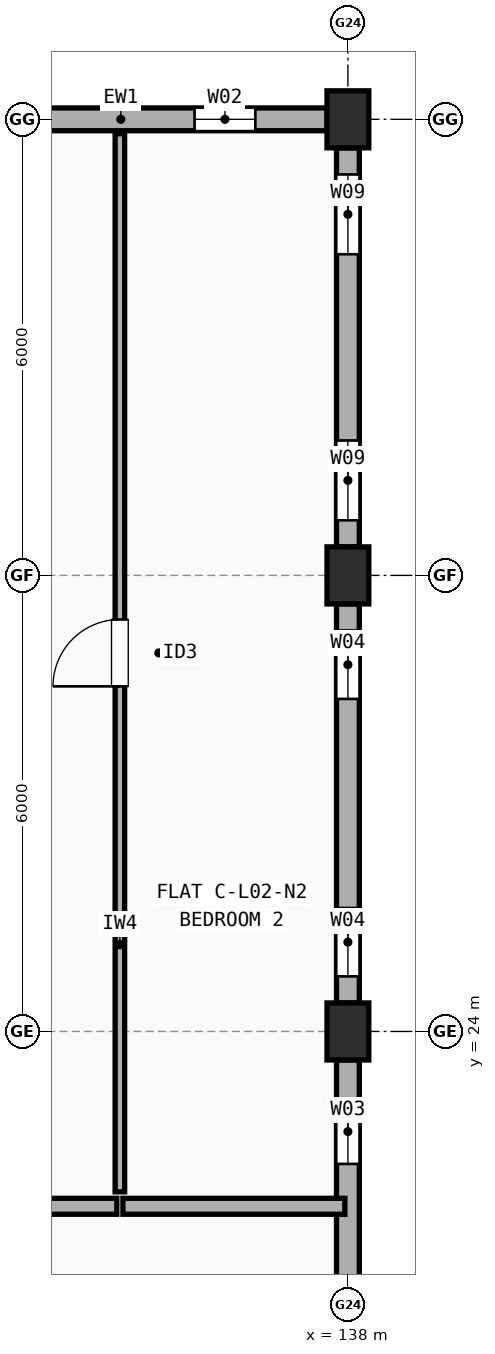
"""IFC4 building model, lengths in metres.
Left out: names, types, materials, properties, quantities, classifications, styles, units other than length and angle.
Written with IfcOpenShell. Run it as: python <this file> out.ifc"""

import sys

from ifc_helpers import new_model, si_unit, direction, frame, frame_2d, origin, origin_2d, place, context, subcontext, project, spatial, rectangle, extrude, element, fill, save


model = new_model("IFC4")
c1 = context("Model", 3, precision=1e-05, world=origin(), true_north=direction((0.0, 1.0)))
c2 = subcontext(c1, "Body", "Model", "MODEL_VIEW")
j1 = project(units=[si_unit("LENGTHUNIT", "METRE"), si_unit("PLANEANGLEUNIT", "RADIAN")], contexts=[c1])
p1 = place(None, origin())
s1 = spatial("IfcSite", under=j1, at=p1, CompositionType="ELEMENT")
p2 = place(p1, origin())
s2 = spatial("IfcBuilding", under=s1, at=p2, CompositionType="ELEMENT")
p3 = place(p2, frame((0.0, 0.0, 7.7)))
s3 = spatial("IfcBuildingStorey", under=s2, at=p3, CompositionType="ELEMENT", Elevation=7.7)
for number, where, z_axis, x_axis in (
    (1, (138.0, 24.0, 0.0), (0.0, 0.0, 1.0), (1.0, 0.0, 0.0)),
    (2, (138.0, 30.0, 0.0), (0.0, 0.0, 1.0), (1.0, 0.0, 0.0)),
    (3, (138.0, 36.0, 0.0), (0.0, 0.0, 1.0), (1.0, 0.0, 0.0)),
):
    element("IfcColumn", number, at=place(p3, frame(where, z_axis=z_axis, x_axis=x_axis)), inside=s3, PredefinedType="COLUMN", context=c2, shape_type="SweptSolid", body=[
        extrude(rectangle(XDim=0.55, YDim=0.75, at=origin_2d()), origin(), (0.0, 0.0, 1.0), 2.955),
    ])
p4 = place(p3, frame((138.0, 18.375, 0.0), z_axis=(0.0, 0.0, 1.0), x_axis=(0.0, 1.0, 0.0)))
e4 = element("IfcWall", 4, at=p4, inside=s3, PredefinedType="STANDARD", context=c2, shape_type="SweptSolid", body=[
    extrude(rectangle(XDim=5.25, YDim=0.3, at=frame_2d((2.625, 0.0))), origin(), (0.0, 0.0, 1.0), 2.437),
])
p5 = place(p4, frame((1.242, 0.0, 0.9)))
e5 = element("IfcOpeningElement", 5, at=p5, cuts=e4, PredefinedType="OPENING", context=c2, shape_type="SweptSolid", body=[
    extrude(rectangle(XDim=0.8, YDim=1.2, at=frame_2d((0.4, 0.6))), frame((0.0, 0.16, 0.0), z_axis=(0.0, -1.0, 0.0), x_axis=(1.0, 0.0, 0.0)), (0.0, 0.0, 1.0), 0.32),
])
p6 = place(p4, frame((3.883, 0.0, 0.9)))
e6 = element("IfcOpeningElement", 6, at=p6, cuts=e4, PredefinedType="OPENING", context=c2, shape_type="SweptSolid", body=[
    extrude(rectangle(XDim=0.85, YDim=1.25, at=frame_2d((0.425, 0.625))), frame((0.0, 0.16, 0.0), z_axis=(0.0, -1.0, 0.0), x_axis=(1.0, 0.0, 0.0)), (0.0, 0.0, 1.0), 0.32),
])
p7 = place(p3, frame((138.0, 24.375, 0.0), z_axis=(0.0, 0.0, 1.0), x_axis=(0.0, 1.0, 0.0)))
e7 = element("IfcWall", 7, at=p7, inside=s3, PredefinedType="STANDARD", context=c2, shape_type="SweptSolid", body=[
    extrude(rectangle(XDim=5.25, YDim=0.3, at=frame_2d((2.625, 0.0))), origin(), (0.0, 0.0, 1.0), 2.437),
])
p8 = place(p7, frame((0.35, 0.0, 0.9)))
e8 = element("IfcOpeningElement", 8, at=p8, cuts=e7, PredefinedType="OPENING", context=c2, shape_type="SweptSolid", body=[
    extrude(rectangle(XDim=0.9, YDim=1.3, at=frame_2d((0.45, 0.65))), frame((0.0, 0.16, 0.0), z_axis=(0.0, -1.0, 0.0), x_axis=(1.0, 0.0, 0.0)), (0.0, 0.0, 1.0), 0.32),
])
p9 = place(p7, frame((4.0, 0.0, 0.9)))
e9 = element("IfcOpeningElement", 9, at=p9, cuts=e7, PredefinedType="OPENING", context=c2, shape_type="SweptSolid", body=[
    extrude(rectangle(XDim=0.9, YDim=1.3, at=frame_2d((0.45, 0.65))), frame((0.0, 0.16, 0.0), z_axis=(0.0, -1.0, 0.0), x_axis=(1.0, 0.0, 0.0)), (0.0, 0.0, 1.0), 0.32),
])
p10 = place(p3, frame((138.0, 30.375, 0.0), z_axis=(0.0, 0.0, 1.0), x_axis=(0.0, 1.0, 0.0)))
e10 = element("IfcWall", 10, at=p10, inside=s3, PredefinedType="STANDARD", context=c2, shape_type="SweptSolid", body=[
    extrude(rectangle(XDim=5.25, YDim=0.3, at=frame_2d((2.625, 0.0))), origin(), (0.0, 0.0, 1.0), 2.437),
])
p11 = place(p10, frame((0.35, 0.0, 0.9)))
e11 = element("IfcOpeningElement", 11, at=p11, cuts=e10, PredefinedType="OPENING", context=c2, shape_type="SweptSolid", body=[
    extrude(rectangle(XDim=1.05, YDim=1.35, at=frame_2d((0.525, 0.675))), frame((0.0, 0.16, 0.0), z_axis=(0.0, -1.0, 0.0), x_axis=(1.0, 0.0, 0.0)), (0.0, 0.0, 1.0), 0.32),
])
p12 = place(p10, frame((3.85, 0.0, 0.9)))
e12 = element("IfcOpeningElement", 12, at=p12, cuts=e10, PredefinedType="OPENING", context=c2, shape_type="SweptSolid", body=[
    extrude(rectangle(XDim=1.05, YDim=1.35, at=frame_2d((0.525, 0.675))), frame((0.0, 0.16, 0.0), z_axis=(0.0, -1.0, 0.0), x_axis=(1.0, 0.0, 0.0)), (0.0, 0.0, 1.0), 0.32),
])
p13 = place(p3, frame((137.725, 36.0, 0.0), z_axis=(0.0, 0.0, 1.0), x_axis=(-1.0, 0.0, 0.0)))
e13 = element("IfcWall", 13, at=p13, inside=s3, PredefinedType="STANDARD", context=c2, shape_type="SweptSolid", body=[
    extrude(rectangle(XDim=5.45, YDim=0.3, at=frame_2d((2.725, 0.0))), origin(), (0.0, 0.0, 1.0), 2.437),
])
p14 = place(p13, frame((0.942, 0.0, 0.9)))
e14 = element("IfcOpeningElement", 14, at=p14, cuts=e13, PredefinedType="OPENING", context=c2, shape_type="SweptSolid", body=[
    extrude(rectangle(XDim=0.8, YDim=1.2, at=frame_2d((0.4, 0.6))), frame((0.0, 0.16, 0.0), z_axis=(0.0, -1.0, 0.0), x_axis=(1.0, 0.0, 0.0)), (0.0, 0.0, 1.0), 0.32),
])
p15 = place(p13, frame((3.683, 0.0, 0.9)))
e15 = element("IfcOpeningElement", 15, at=p15, cuts=e13, PredefinedType="OPENING", context=c2, shape_type="SweptSolid", body=[
    extrude(rectangle(XDim=0.85, YDim=1.25, at=frame_2d((0.425, 0.625))), frame((0.0, 0.16, 0.0), z_axis=(0.0, -1.0, 0.0), x_axis=(1.0, 0.0, 0.0)), (0.0, 0.0, 1.0), 0.32),
])
p16 = place(p3, frame((124.54, 21.7, 0.0), z_axis=(0.0, 0.0, 1.0), x_axis=(1.0, 0.0, 0.0)))
e16 = element("IfcWall", 16, at=p16, inside=s3, PredefinedType="SOLIDWALL", context=c2, shape_type="SweptSolid", body=[
    extrude(rectangle(XDim=10.42, YDim=0.21, at=frame_2d((5.21, 0.0))), origin(), (0.0, 0.0, 1.0), 2.437),
])
p17 = place(p16, frame((4.72, 0.0, 0.0)))
e17 = element("IfcOpeningElement", 17, at=p17, cuts=e16, PredefinedType="OPENING", context=c2, shape_type="SweptSolid", body=[
    extrude(rectangle(XDim=0.98, YDim=2.15, at=frame_2d((0.49, 1.075))), frame((0.0, 0.115, 0.0), z_axis=(0.0, -1.0, 0.0), x_axis=(1.0, 0.0, 0.0)), (0.0, 0.0, 1.0), 0.23),
])
p18 = place(p3, frame((135.04, 21.7, 0.0), z_axis=(0.0, 0.0, 1.0), x_axis=(1.0, 0.0, 0.0)))
e18 = element("IfcWall", 18, at=p18, inside=s3, PredefinedType="SOLIDWALL", context=c2, shape_type="SweptSolid", body=[
    extrude(rectangle(XDim=2.92, YDim=0.21, at=frame_2d((1.46, 0.0))), origin(), (0.0, 0.0, 1.0), 2.437),
])
p19 = place(p3, frame((135.0, 21.89, 0.0), z_axis=(0.0, 0.0, 1.0), x_axis=(0.0, 1.0, 0.0)))
e19 = element("IfcWall", 19, at=p19, inside=s3, PredefinedType="PARTITIONING", context=c2, shape_type="SweptSolid", body=[
    extrude(rectangle(XDim=13.92, YDim=0.125, at=frame_2d((6.96, 0.0))), origin(), (0.0, 0.0, 1.0), 2.387),
])
p20 = place(p19, frame((6.65, 0.0, 0.0)))
e20 = element("IfcOpeningElement", 20, at=p20, cuts=e19, PredefinedType="OPENING", context=c2, shape_type="SweptSolid", body=[
    extrude(rectangle(XDim=0.88, YDim=2.1, at=frame_2d((0.44, 1.05))), frame((0.0, 0.073, 0.0), z_axis=(0.0, -1.0, 0.0), x_axis=(1.0, 0.0, 0.0)), (0.0, 0.0, 1.0), 0.145),
])
p21 = place(p6, origin())
e21 = element("IfcWindow", 21, at=p21, inside=s3, PartitioningType="SINGLE_PANEL", PredefinedType="WINDOW", context=c2, shape_type="SweptSolid", body=[
    extrude(rectangle(XDim=0.85, YDim=1.25, at=frame_2d((0.425, 0.625))), frame((0.0, 0.03, 0.0), z_axis=(0.0, -1.0, 0.0), x_axis=(1.0, 0.0, 0.0)), (0.0, 0.0, 1.0), 0.06),
])
fill(e6, e21)
p22 = place(p8, origin())
e22 = element("IfcWindow", 22, at=p22, inside=s3, PartitioningType="SINGLE_PANEL", PredefinedType="WINDOW", context=c2, shape_type="SweptSolid", body=[
    extrude(rectangle(XDim=0.9, YDim=1.3, at=frame_2d((0.45, 0.65))), frame((0.0, 0.03, 0.0), z_axis=(0.0, -1.0, 0.0), x_axis=(1.0, 0.0, 0.0)), (0.0, 0.0, 1.0), 0.06),
])
fill(e8, e22)
p23 = place(p9, origin())
e23 = element("IfcWindow", 23, at=p23, inside=s3, PartitioningType="SINGLE_PANEL", PredefinedType="WINDOW", context=c2, shape_type="SweptSolid", body=[
    extrude(rectangle(XDim=0.9, YDim=1.3, at=frame_2d((0.45, 0.65))), frame((0.0, 0.03, 0.0), z_axis=(0.0, -1.0, 0.0), x_axis=(1.0, 0.0, 0.0)), (0.0, 0.0, 1.0), 0.06),
])
fill(e9, e23)
p24 = place(p11, origin())
e24 = element("IfcWindow", 24, at=p24, inside=s3, PartitioningType="SINGLE_PANEL", PredefinedType="WINDOW", context=c2, shape_type="SweptSolid", body=[
    extrude(rectangle(XDim=1.05, YDim=1.35, at=frame_2d((0.525, 0.675))), frame((0.0, 0.03, 0.0), z_axis=(0.0, -1.0, 0.0), x_axis=(1.0, 0.0, 0.0)), (0.0, 0.0, 1.0), 0.06),
])
fill(e11, e24)
p25 = place(p12, origin())
e25 = element("IfcWindow", 25, at=p25, inside=s3, PartitioningType="SINGLE_PANEL", PredefinedType="WINDOW", context=c2, shape_type="SweptSolid", body=[
    extrude(rectangle(XDim=1.05, YDim=1.35, at=frame_2d((0.525, 0.675))), frame((0.0, 0.03, 0.0), z_axis=(0.0, -1.0, 0.0), x_axis=(1.0, 0.0, 0.0)), (0.0, 0.0, 1.0), 0.06),
])
fill(e12, e25)
p26 = place(p14, origin())
e26 = element("IfcWindow", 26, at=p26, inside=s3, PartitioningType="SINGLE_PANEL", PredefinedType="WINDOW", context=c2, shape_type="SweptSolid", body=[
    extrude(rectangle(XDim=0.8, YDim=1.2, at=frame_2d((0.4, 0.6))), frame((0.0, 0.03, 0.0), z_axis=(0.0, -1.0, 0.0), x_axis=(1.0, 0.0, 0.0)), (0.0, 0.0, 1.0), 0.06),
])
fill(e14, e26)
p27 = place(p20, origin())
e27 = element("IfcDoor", 27, at=p27, inside=s3, OperationType="SINGLE_SWING_LEFT", PredefinedType="DOOR", context=c2, shape_type="SweptSolid", body=[
    extrude(rectangle(XDim=0.88, YDim=2.1, at=frame_2d((0.44, 1.05))), frame((0.0, 0.025, 0.0), z_axis=(0.0, -1.0, 0.0), x_axis=(1.0, 0.0, 0.0)), (0.0, 0.0, 1.0), 0.05),
])
fill(e20, e27)
save(model, sys.argv[1])
